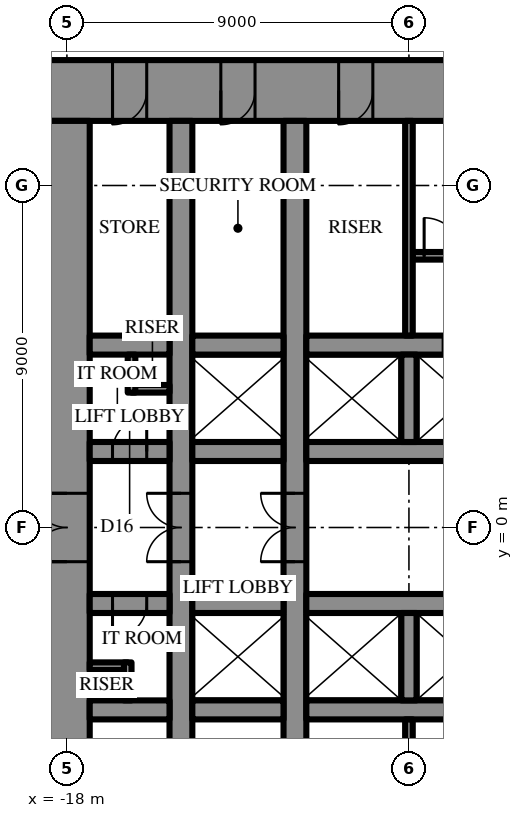
"""IFC4 building model, lengths in metres.
Left out: names, types, materials, properties, quantities, classifications, styles, units other than length and angle.
Written with IfcOpenShell. Run it as: python <this file> out.ifc"""

import sys

from ifc_helpers import new_model, si_unit, direction, frame, frame_2d, origin, place, context, subcontext, project, spatial, rectangle, extrude, element, fill, save


model = new_model("IFC4")
c1 = context("Model", 3, precision=1e-05, world=origin(), true_north=direction((0.0, 1.0)))
c2 = subcontext(c1, "Body", "Model", "MODEL_VIEW")
j1 = project(units=[si_unit("LENGTHUNIT", "METRE"), si_unit("PLANEANGLEUNIT", "RADIAN")], contexts=[c1])
p1 = place(None, origin())
s1 = spatial("IfcSite", under=j1, at=p1, CompositionType="ELEMENT")
p2 = place(p1, origin())
s2 = spatial("IfcBuilding", under=s1, at=p2, CompositionType="ELEMENT")
p3 = place(p2, frame((0.0, 0.0, 127.9)))
s3 = spatial("IfcBuildingStorey", under=s2, at=p3, CompositionType="ELEMENT", Elevation=127.9)
p4 = place(p3, frame((-18.6, 11.5, 0.0), z_axis=(0.0, 0.0, 1.0), x_axis=(1.0, 0.0, 0.0)))
e1 = element("IfcWall", 1, at=p4, inside=s3, PredefinedType="SHEAR", context=c2, shape_type="SweptSolid", body=[
    extrude(rectangle(XDim=37.2, YDim=1.6, at=frame_2d((18.6, 0.0))), origin(), (0.0, 0.0, 1.0), 4.2),
])
p5 = place(p4, frame((19.45, 0.0, 0.0)))
e2 = element("IfcOpeningElement", 2, at=p5, cuts=e1, PredefinedType="OPENING", context=c2, shape_type="SweptSolid", body=[
    extrude(rectangle(XDim=0.9, YDim=2.2, at=frame_2d((0.45, 1.1))), frame((0.0, 0.81, 0.0), z_axis=(0.0, -1.0, 0.0), x_axis=(1.0, 0.0, 0.0)), (0.0, 0.0, 1.0), 1.62),
])
p6 = place(p4, frame((22.45, 0.0, 0.0)))
e3 = element("IfcOpeningElement", 3, at=p6, cuts=e1, PredefinedType="OPENING", context=c2, shape_type="SweptSolid", body=[
    extrude(rectangle(XDim=0.9, YDim=2.2, at=frame_2d((0.45, 1.1))), frame((0.0, 0.81, 0.0), z_axis=(0.0, -1.0, 0.0), x_axis=(1.0, 0.0, 0.0)), (0.0, 0.0, 1.0), 1.62),
])
p7 = place(p4, frame((25.5, 0.0, 0.0)))
e4 = element("IfcOpeningElement", 4, at=p7, cuts=e1, PredefinedType="OPENING", context=c2, shape_type="SweptSolid", body=[
    extrude(rectangle(XDim=1.0, YDim=2.2, at=frame_2d((0.5, 1.1))), frame((0.0, 0.81, 0.0), z_axis=(0.0, -1.0, 0.0), x_axis=(1.0, 0.0, 0.0)), (0.0, 0.0, 1.0), 1.62),
])
p8 = place(p4, frame((1.8, 0.0, 0.0)))
e5 = element("IfcOpeningElement", 5, at=p8, cuts=e1, PredefinedType="OPENING", context=c2, shape_type="SweptSolid", body=[
    extrude(rectangle(XDim=0.9, YDim=2.2, at=frame_2d((0.45, 1.1))), frame((0.0, 0.81, 0.0), z_axis=(0.0, -1.0, 0.0), x_axis=(1.0, 0.0, 0.0)), (0.0, 0.0, 1.0), 1.62),
])
p9 = place(p4, frame((4.65, 0.0, 0.0)))
e6 = element("IfcOpeningElement", 6, at=p9, cuts=e1, PredefinedType="OPENING", context=c2, shape_type="SweptSolid", body=[
    extrude(rectangle(XDim=0.9, YDim=2.2, at=frame_2d((0.45, 1.1))), frame((0.0, 0.81, 0.0), z_axis=(0.0, -1.0, 0.0), x_axis=(1.0, 0.0, 0.0)), (0.0, 0.0, 1.0), 1.62),
])
p10 = place(p4, frame((7.75, 0.0, 0.0)))
e7 = element("IfcOpeningElement", 7, at=p10, cuts=e1, PredefinedType="OPENING", context=c2, shape_type="SweptSolid", body=[
    extrude(rectangle(XDim=0.9, YDim=2.2, at=frame_2d((0.45, 1.1))), frame((0.0, 0.81, 0.0), z_axis=(0.0, -1.0, 0.0), x_axis=(1.0, 0.0, 0.0)), (0.0, 0.0, 1.0), 1.62),
])
p11 = place(p4, frame((28.55, 0.0, 0.0)))
e8 = element("IfcOpeningElement", 8, at=p11, cuts=e1, PredefinedType="OPENING", context=c2, shape_type="SweptSolid", body=[
    extrude(rectangle(XDim=0.9, YDim=2.2, at=frame_2d((0.45, 1.1))), frame((0.0, 0.81, 0.0), z_axis=(0.0, -1.0, 0.0), x_axis=(1.0, 0.0, 0.0)), (0.0, 0.0, 1.0), 1.62),
])
p12 = place(p4, frame((31.65, 0.0, 0.0)))
e9 = element("IfcOpeningElement", 9, at=p12, cuts=e1, PredefinedType="OPENING", context=c2, shape_type="SweptSolid", body=[
    extrude(rectangle(XDim=0.9, YDim=2.2, at=frame_2d((0.45, 1.1))), frame((0.0, 0.81, 0.0), z_axis=(0.0, -1.0, 0.0), x_axis=(1.0, 0.0, 0.0)), (0.0, 0.0, 1.0), 1.62),
])
p13 = place(p4, frame((34.5, 0.0, 0.0)))
e10 = element("IfcOpeningElement", 10, at=p13, cuts=e1, PredefinedType="OPENING", context=c2, shape_type="SweptSolid", body=[
    extrude(rectangle(XDim=0.9, YDim=2.2, at=frame_2d((0.45, 1.1))), frame((0.0, 0.81, 0.0), z_axis=(0.0, -1.0, 0.0), x_axis=(1.0, 0.0, 0.0)), (0.0, 0.0, 1.0), 1.62),
])
p14 = place(p3, frame((-18.0, 10.7, 0.0), z_axis=(0.0, 0.0, 1.0), x_axis=(0.0, -1.0, 0.0)))
e11 = element("IfcWall", 11, at=p14, inside=s3, PredefinedType="SHEAR", context=c2, shape_type="SweptSolid", body=[
    extrude(rectangle(XDim=21.4, YDim=1.2, at=frame_2d((10.7, 0.0))), origin(), (0.0, 0.0, 1.0), 4.2),
])
p15 = place(p14, frame((9.8, 0.0, 0.0)))
e12 = element("IfcOpeningElement", 12, at=p15, cuts=e11, PredefinedType="OPENING", context=c2, shape_type="SweptSolid", body=[
    extrude(rectangle(XDim=1.8, YDim=2.4, at=frame_2d((0.9, 1.2))), frame((0.0, 0.61, 0.0), z_axis=(0.0, -1.0, 0.0), x_axis=(1.0, 0.0, 0.0)), (0.0, 0.0, 1.0), 1.22),
])
p16 = place(p3, frame((-12.0, -10.7, 0.0), z_axis=(0.0, 0.0, 1.0), x_axis=(0.0, 1.0, 0.0)))
e13 = element("IfcWall", 13, at=p16, inside=s3, PredefinedType="SHEAR", context=c2, shape_type="SweptSolid", body=[
    extrude(rectangle(XDim=21.4, YDim=0.6, at=frame_2d((10.7, 0.0))), origin(), (0.0, 0.0, 1.0), 4.2),
])
p17 = place(p16, frame((9.8, 0.0, 0.0)))
e14 = element("IfcOpeningElement", 14, at=p17, cuts=e13, PredefinedType="OPENING", context=c2, shape_type="SweptSolid", body=[
    extrude(rectangle(XDim=1.8, YDim=2.4, at=frame_2d((0.9, 1.2))), frame((0.0, 0.31, 0.0), z_axis=(0.0, -1.0, 0.0), x_axis=(1.0, 0.0, 0.0)), (0.0, 0.0, 1.0), 0.62),
])
p18 = place(p3, frame((-15.0, -10.7, 0.0), z_axis=(0.0, 0.0, 1.0), x_axis=(0.0, 1.0, 0.0)))
e15 = element("IfcWall", 15, at=p18, inside=s3, PredefinedType="SHEAR", context=c2, shape_type="SweptSolid", body=[
    extrude(rectangle(XDim=21.4, YDim=0.6, at=frame_2d((10.7, 0.0))), origin(), (0.0, 0.0, 1.0), 4.2),
])
p19 = place(p18, frame((9.8, 0.0, 0.0)))
e16 = element("IfcOpeningElement", 16, at=p19, cuts=e15, PredefinedType="OPENING", context=c2, shape_type="SweptSolid", body=[
    extrude(rectangle(XDim=1.8, YDim=2.4, at=frame_2d((0.9, 1.2))), frame((0.0, 0.31, 0.0), z_axis=(0.0, -1.0, 0.0), x_axis=(1.0, 0.0, 0.0)), (0.0, 0.0, 1.0), 0.62),
])
p20 = place(p3, frame((-17.4, 2.0, 0.0), z_axis=(0.0, 0.0, 1.0), x_axis=(1.0, 0.0, 0.0)))
e17 = element("IfcWall", 17, at=p20, inside=s3, PredefinedType="SHEAR", context=c2, shape_type="SweptSolid", body=[
    extrude(rectangle(XDim=2.1, YDim=0.5, at=frame_2d((1.05, 0.0))), origin(), (0.0, 0.0, 1.0), 4.2),
])
p21 = place(p20, frame((0.6, 0.0, 0.0)))
e18 = element("IfcOpeningElement", 18, at=p21, cuts=e17, PredefinedType="OPENING", context=c2, shape_type="SweptSolid", body=[
    extrude(rectangle(XDim=0.9, YDim=2.2, at=frame_2d((0.45, 1.1))), frame((0.0, 0.26, 0.0), z_axis=(0.0, -1.0, 0.0), x_axis=(1.0, 0.0, 0.0)), (0.0, 0.0, 1.0), 0.52),
])
p22 = place(p3, frame((-14.7, 2.0, 0.0), z_axis=(0.0, 0.0, 1.0), x_axis=(1.0, 0.0, 0.0)))
e19 = element("IfcWall", 19, at=p22, inside=s3, PredefinedType="SHEAR", context=c2, shape_type="SweptSolid", body=[
    extrude(rectangle(XDim=2.4, YDim=0.5, at=frame_2d((1.2, 0.0))), origin(), (0.0, 0.0, 1.0), 4.2),
])
p23 = place(p3, frame((-11.7, 2.0, 0.0), z_axis=(0.0, 0.0, 1.0), x_axis=(1.0, 0.0, 0.0)))
e20 = element("IfcWall", 20, at=p23, inside=s3, PredefinedType="SHEAR", context=c2, shape_type="SweptSolid", body=[
    extrude(rectangle(XDim=5.9, YDim=0.5, at=frame_2d((2.95, 0.0))), origin(), (0.0, 0.0, 1.0), 4.2),
])
p24 = place(p3, frame((-17.4, 4.8, 0.0), z_axis=(0.0, 0.0, 1.0), x_axis=(1.0, 0.0, 0.0)))
e21 = element("IfcWall", 21, at=p24, inside=s3, PredefinedType="SHEAR", context=c2, shape_type="SweptSolid", body=[
    extrude(rectangle(XDim=2.1, YDim=0.5, at=frame_2d((1.05, 0.0))), origin(), (0.0, 0.0, 1.0), 4.2),
])
p25 = place(p3, frame((-14.7, 4.8, 0.0), z_axis=(0.0, 0.0, 1.0), x_axis=(1.0, 0.0, 0.0)))
e22 = element("IfcWall", 22, at=p25, inside=s3, PredefinedType="SHEAR", context=c2, shape_type="SweptSolid", body=[
    extrude(rectangle(XDim=2.4, YDim=0.5, at=frame_2d((1.2, 0.0))), origin(), (0.0, 0.0, 1.0), 4.2),
])
p26 = place(p3, frame((-11.7, 4.8, 0.0), z_axis=(0.0, 0.0, 1.0), x_axis=(1.0, 0.0, 0.0)))
e23 = element("IfcWall", 23, at=p26, inside=s3, PredefinedType="SHEAR", context=c2, shape_type="SweptSolid", body=[
    extrude(rectangle(XDim=23.4, YDim=0.5, at=frame_2d((11.7, 0.0))), origin(), (0.0, 0.0, 1.0), 4.2),
])
p27 = place(p26, frame((6.6, 0.0, 0.0)))
e24 = element("IfcOpeningElement", 24, at=p27, cuts=e23, PredefinedType="OPENING", context=c2, shape_type="SweptSolid", body=[
    extrude(rectangle(XDim=1.2, YDim=2.2, at=frame_2d((0.6, 1.1))), frame((0.0, 0.26, 0.0), z_axis=(0.0, -1.0, 0.0), x_axis=(1.0, 0.0, 0.0)), (0.0, 0.0, 1.0), 0.52),
])
p28 = place(p26, frame((3.6, 0.0, 0.0)))
e25 = element("IfcOpeningElement", 25, at=p28, cuts=e23, PredefinedType="OPENING", context=c2, shape_type="SweptSolid", body=[
    extrude(rectangle(XDim=1.2, YDim=2.2, at=frame_2d((0.6, 1.1))), frame((0.0, 0.26, 0.0), z_axis=(0.0, -1.0, 0.0), x_axis=(1.0, 0.0, 0.0)), (0.0, 0.0, 1.0), 0.52),
])
p29 = place(p3, frame((-9.0, 2.25, 0.0), z_axis=(0.0, 0.0, 1.0), x_axis=(0.0, 1.0, 0.0)))
e26 = element("IfcWall", 26, at=p29, inside=s3, PredefinedType="SHEAR", context=c2, shape_type="SweptSolid", body=[
    extrude(rectangle(XDim=2.3, YDim=0.4, at=frame_2d((1.15, 0.0))), origin(), (0.0, 0.0, 1.0), 4.2),
])
p30 = place(p3, frame((-8.9, 7.15, 0.0), z_axis=(0.0, 0.0, 1.0), x_axis=(1.0, 0.0, 0.0)))
e27 = element("IfcWall", 27, at=p30, inside=s3, PredefinedType="SHEAR", context=c2, shape_type="SweptSolid", body=[
    extrude(rectangle(XDim=8.6, YDim=0.2, at=frame_2d((4.3, 0.0))), origin(), (0.0, 0.0, 1.0), 4.2),
])
p31 = place(p30, frame((0.3, 0.0, 0.0)))
e28 = element("IfcOpeningElement", 28, at=p31, cuts=e27, PredefinedType="OPENING", context=c2, shape_type="SweptSolid", body=[
    extrude(rectangle(XDim=1.0, YDim=2.2, at=frame_2d((0.5, 1.1))), frame((0.0, 0.11, 0.0), z_axis=(0.0, -1.0, 0.0), x_axis=(1.0, 0.0, 0.0)), (0.0, 0.0, 1.0), 0.22),
])
p32 = place(p3, frame((3.2, -2.0, 0.0), z_axis=(0.0, 0.0, 1.0), x_axis=(-1.0, 0.0, 0.0)))
e29 = element("IfcWall", 29, at=p32, inside=s3, PredefinedType="SHEAR", context=c2, shape_type="SweptSolid", body=[
    extrude(rectangle(XDim=14.9, YDim=0.5, at=frame_2d((7.45, 0.0))), origin(), (0.0, 0.0, 1.0), 4.2),
])
p33 = place(p32, frame((1.15, 0.0, 0.0)))
e30 = element("IfcOpeningElement", 30, at=p33, cuts=e29, PredefinedType="OPENING", context=c2, shape_type="SweptSolid", body=[
    extrude(rectangle(XDim=1.1, YDim=2.2, at=frame_2d((0.55, 1.1))), frame((0.0, 0.26, 0.0), z_axis=(0.0, -1.0, 0.0), x_axis=(1.0, 0.0, 0.0)), (0.0, 0.0, 1.0), 0.52),
])
p34 = place(p32, frame((4.15, 0.0, 0.0)))
e31 = element("IfcOpeningElement", 31, at=p34, cuts=e29, PredefinedType="OPENING", context=c2, shape_type="SweptSolid", body=[
    extrude(rectangle(XDim=1.1, YDim=2.2, at=frame_2d((0.55, 1.1))), frame((0.0, 0.26, 0.0), z_axis=(0.0, -1.0, 0.0), x_axis=(1.0, 0.0, 0.0)), (0.0, 0.0, 1.0), 0.52),
])
p35 = place(p32, frame((7.15, 0.0, 0.0)))
e32 = element("IfcOpeningElement", 32, at=p35, cuts=e29, PredefinedType="OPENING", context=c2, shape_type="SweptSolid", body=[
    extrude(rectangle(XDim=1.1, YDim=2.2, at=frame_2d((0.55, 1.1))), frame((0.0, 0.26, 0.0), z_axis=(0.0, -1.0, 0.0), x_axis=(1.0, 0.0, 0.0)), (0.0, 0.0, 1.0), 0.52),
])
p36 = place(p32, frame((10.15, 0.0, 0.0)))
e33 = element("IfcOpeningElement", 33, at=p36, cuts=e29, PredefinedType="OPENING", context=c2, shape_type="SweptSolid", body=[
    extrude(rectangle(XDim=1.1, YDim=2.2, at=frame_2d((0.55, 1.1))), frame((0.0, 0.26, 0.0), z_axis=(0.0, -1.0, 0.0), x_axis=(1.0, 0.0, 0.0)), (0.0, 0.0, 1.0), 0.52),
])
p37 = place(p3, frame((-12.3, -2.0, 0.0), z_axis=(0.0, 0.0, 1.0), x_axis=(-1.0, 0.0, 0.0)))
e34 = element("IfcWall", 34, at=p37, inside=s3, PredefinedType="SHEAR", context=c2, shape_type="SweptSolid", body=[
    extrude(rectangle(XDim=2.4, YDim=0.5, at=frame_2d((1.2, 0.0))), origin(), (0.0, 0.0, 1.0), 4.2),
])
p38 = place(p3, frame((-15.3, -2.0, 0.0), z_axis=(0.0, 0.0, 1.0), x_axis=(-1.0, 0.0, 0.0)))
e35 = element("IfcWall", 35, at=p38, inside=s3, PredefinedType="SHEAR", context=c2, shape_type="SweptSolid", body=[
    extrude(rectangle(XDim=2.1, YDim=0.5, at=frame_2d((1.05, 0.0))), origin(), (0.0, 0.0, 1.0), 4.2),
])
p39 = place(p38, frame((0.6, 0.0, 0.0)))
e36 = element("IfcOpeningElement", 36, at=p39, cuts=e35, PredefinedType="OPENING", context=c2, shape_type="SweptSolid", body=[
    extrude(rectangle(XDim=0.9, YDim=2.2, at=frame_2d((0.45, 1.1))), frame((0.0, 0.26, 0.0), z_axis=(0.0, -1.0, 0.0), x_axis=(1.0, 0.0, 0.0)), (0.0, 0.0, 1.0), 0.52),
])
p40 = place(p3, frame((11.7, -4.8, 0.0), z_axis=(0.0, 0.0, 1.0), x_axis=(-1.0, 0.0, 0.0)))
e37 = element("IfcWall", 37, at=p40, inside=s3, PredefinedType="SHEAR", context=c2, shape_type="SweptSolid", body=[
    extrude(rectangle(XDim=23.4, YDim=0.5, at=frame_2d((11.7, 0.0))), origin(), (0.0, 0.0, 1.0), 4.2),
])
p41 = place(p40, frame((6.6, 0.0, 0.0)))
e38 = element("IfcOpeningElement", 38, at=p41, cuts=e37, PredefinedType="OPENING", context=c2, shape_type="SweptSolid", body=[
    extrude(rectangle(XDim=1.2, YDim=2.2, at=frame_2d((0.6, 1.1))), frame((0.0, 0.26, 0.0), z_axis=(0.0, -1.0, 0.0), x_axis=(1.0, 0.0, 0.0)), (0.0, 0.0, 1.0), 0.52),
])
p42 = place(p40, frame((3.6, 0.0, 0.0)))
e39 = element("IfcOpeningElement", 39, at=p42, cuts=e37, PredefinedType="OPENING", context=c2, shape_type="SweptSolid", body=[
    extrude(rectangle(XDim=1.2, YDim=2.2, at=frame_2d((0.6, 1.1))), frame((0.0, 0.26, 0.0), z_axis=(0.0, -1.0, 0.0), x_axis=(1.0, 0.0, 0.0)), (0.0, 0.0, 1.0), 0.52),
])
p43 = place(p3, frame((-12.3, -4.8, 0.0), z_axis=(0.0, 0.0, 1.0), x_axis=(-1.0, 0.0, 0.0)))
e40 = element("IfcWall", 40, at=p43, inside=s3, PredefinedType="SHEAR", context=c2, shape_type="SweptSolid", body=[
    extrude(rectangle(XDim=2.4, YDim=0.5, at=frame_2d((1.2, 0.0))), origin(), (0.0, 0.0, 1.0), 4.2),
])
p44 = place(p3, frame((-15.3, -4.8, 0.0), z_axis=(0.0, 0.0, 1.0), x_axis=(-1.0, 0.0, 0.0)))
e41 = element("IfcWall", 41, at=p44, inside=s3, PredefinedType="SHEAR", context=c2, shape_type="SweptSolid", body=[
    extrude(rectangle(XDim=2.1, YDim=0.5, at=frame_2d((1.05, 0.0))), origin(), (0.0, 0.0, 1.0), 4.2),
])
p45 = place(p3, frame((-9.0, -2.25, 0.0), z_axis=(0.0, 0.0, 1.0), x_axis=(0.0, -1.0, 0.0)))
e42 = element("IfcWall", 42, at=p45, inside=s3, PredefinedType="SHEAR", context=c2, shape_type="SweptSolid", body=[
    extrude(rectangle(XDim=2.3, YDim=0.4, at=frame_2d((1.15, 0.0))), origin(), (0.0, 0.0, 1.0), 4.2),
])
for number, where, z_axis, x_axis in (
    (43, (-9.0, 5.05, 0.0), (0.0, 0.0, 1.0), (0.0, 1.0, 0.0)),
    (44, (-9.0, -5.05, 0.0), (0.0, 0.0, 1.0), (0.0, -1.0, 0.0)),
):
    element("IfcWall", number, at=place(p3, frame(where, z_axis=z_axis, x_axis=x_axis)), inside=s3, PredefinedType="PARTITIONING", context=c2, shape_type="SweptSolid", body=[
        extrude(rectangle(XDim=5.65, YDim=0.2, at=frame_2d((2.825, 0.0))), origin(), (0.0, 0.0, 1.0), 4.0),
    ])
for number, where, z_axis, x_axis in (
    (45, (-16.3, 3.65, 0.0), (0.0, 0.0, 1.0), (1.0, 0.0, 0.0)),
    (46, (-16.3, 3.55, 0.0), (0.0, 0.0, 1.0), (0.0, 1.0, 0.0)),
    (47, (-16.4, -3.65, 0.0), (0.0, 0.0, 1.0), (-1.0, 0.0, 0.0)),
    (48, (-16.4, -3.55, 0.0), (0.0, 0.0, 1.0), (0.0, -1.0, 0.0)),
):
    element("IfcWall", number, at=place(p3, frame(where, z_axis=z_axis, x_axis=x_axis)), inside=s3, PredefinedType="PARTITIONING", context=c2, shape_type="SweptSolid", body=[
        extrude(rectangle(XDim=1.0, YDim=0.2, at=frame_2d((0.5, 0.0))), origin(), (0.0, 0.0, 1.0), 4.0),
    ])
p46 = place(p15, frame((1.8, 0.0, 0.0), z_axis=(0.0, 0.0, 1.0), x_axis=(-1.0, 0.0, 0.0)))
e49 = element("IfcDoor", 49, at=p46, inside=s3, OperationType="DOUBLE_DOOR_SINGLE_SWING", PredefinedType="DOOR", context=c2, shape_type="SweptSolid", body=[
    extrude(rectangle(XDim=1.8, YDim=2.4, at=frame_2d((0.9, 1.2))), frame((0.0, 0.025, 0.0), z_axis=(0.0, -1.0, 0.0), x_axis=(1.0, 0.0, 0.0)), (0.0, 0.0, 1.0), 0.05),
])
fill(e12, e49)
p47 = place(p31, origin())
e50 = element("IfcDoor", 50, at=p47, inside=s3, OperationType="SINGLE_SWING_RIGHT", PredefinedType="DOOR", context=c2, shape_type="SweptSolid", body=[
    extrude(rectangle(XDim=1.0, YDim=2.2, at=frame_2d((0.5, 1.1))), frame((0.0, 0.025, 0.0), z_axis=(0.0, -1.0, 0.0), x_axis=(1.0, 0.0, 0.0)), (0.0, 0.0, 1.0), 0.05),
])
fill(e28, e50)
p48 = place(p8, frame((0.9, 0.0, 0.0), z_axis=(0.0, 0.0, 1.0), x_axis=(-1.0, 0.0, 0.0)))
e51 = element("IfcDoor", 51, at=p48, inside=s3, OperationType="SINGLE_SWING_LEFT", PredefinedType="DOOR", context=c2, shape_type="SweptSolid", body=[
    extrude(rectangle(XDim=0.9, YDim=2.2, at=frame_2d((0.45, 1.1))), frame((0.0, 0.025, 0.0), z_axis=(0.0, -1.0, 0.0), x_axis=(1.0, 0.0, 0.0)), (0.0, 0.0, 1.0), 0.05),
])
fill(e5, e51)
p49 = place(p9, frame((0.9, 0.0, 0.0), z_axis=(0.0, 0.0, 1.0), x_axis=(-1.0, 0.0, 0.0)))
e52 = element("IfcDoor", 52, at=p49, inside=s3, OperationType="SINGLE_SWING_LEFT", PredefinedType="DOOR", context=c2, shape_type="SweptSolid", body=[
    extrude(rectangle(XDim=0.9, YDim=2.2, at=frame_2d((0.45, 1.1))), frame((0.0, 0.025, 0.0), z_axis=(0.0, -1.0, 0.0), x_axis=(1.0, 0.0, 0.0)), (0.0, 0.0, 1.0), 0.05),
])
fill(e6, e52)
p50 = place(p10, frame((0.9, 0.0, 0.0), z_axis=(0.0, 0.0, 1.0), x_axis=(-1.0, 0.0, 0.0)))
e53 = element("IfcDoor", 53, at=p50, inside=s3, OperationType="SINGLE_SWING_LEFT", PredefinedType="DOOR", context=c2, shape_type="SweptSolid", body=[
    extrude(rectangle(XDim=0.9, YDim=2.2, at=frame_2d((0.45, 1.1))), frame((0.0, 0.025, 0.0), z_axis=(0.0, -1.0, 0.0), x_axis=(1.0, 0.0, 0.0)), (0.0, 0.0, 1.0), 0.05),
])
fill(e7, e53)
p51 = place(p21, origin())
e54 = element("IfcDoor", 54, at=p51, inside=s3, OperationType="SINGLE_SWING_LEFT", PredefinedType="DOOR", context=c2, shape_type="SweptSolid", body=[
    extrude(rectangle(XDim=0.9, YDim=2.2, at=frame_2d((0.45, 1.1))), frame((0.0, 0.025, 0.0), z_axis=(0.0, -1.0, 0.0), x_axis=(1.0, 0.0, 0.0)), (0.0, 0.0, 1.0), 0.05),
])
fill(e18, e54)
p52 = place(p39, origin())
e55 = element("IfcDoor", 55, at=p52, inside=s3, OperationType="SINGLE_SWING_LEFT", PredefinedType="DOOR", context=c2, shape_type="SweptSolid", body=[
    extrude(rectangle(XDim=0.9, YDim=2.2, at=frame_2d((0.45, 1.1))), frame((0.0, 0.025, 0.0), z_axis=(0.0, -1.0, 0.0), x_axis=(1.0, 0.0, 0.0)), (0.0, 0.0, 1.0), 0.05),
])
fill(e36, e55)
p53 = place(p17, origin())
e56 = element("IfcDoor", 56, at=p53, inside=s3, OperationType="DOUBLE_DOOR_SINGLE_SWING", PredefinedType="DOOR", context=c2, shape_type="SweptSolid", body=[
    extrude(rectangle(XDim=1.8, YDim=2.4, at=frame_2d((0.9, 1.2))), frame((0.0, 0.025, 0.0), z_axis=(0.0, -1.0, 0.0), x_axis=(1.0, 0.0, 0.0)), (0.0, 0.0, 1.0), 0.05),
])
fill(e14, e56)
p54 = place(p19, origin())
e57 = element("IfcDoor", 57, at=p54, inside=s3, OperationType="DOUBLE_DOOR_SINGLE_SWING", PredefinedType="DOOR", context=c2, shape_type="SweptSolid", body=[
    extrude(rectangle(XDim=1.8, YDim=2.4, at=frame_2d((0.9, 1.2))), frame((0.0, 0.025, 0.0), z_axis=(0.0, -1.0, 0.0), x_axis=(1.0, 0.0, 0.0)), (0.0, 0.0, 1.0), 0.05),
])
fill(e16, e57)
save(model, sys.argv[1])
